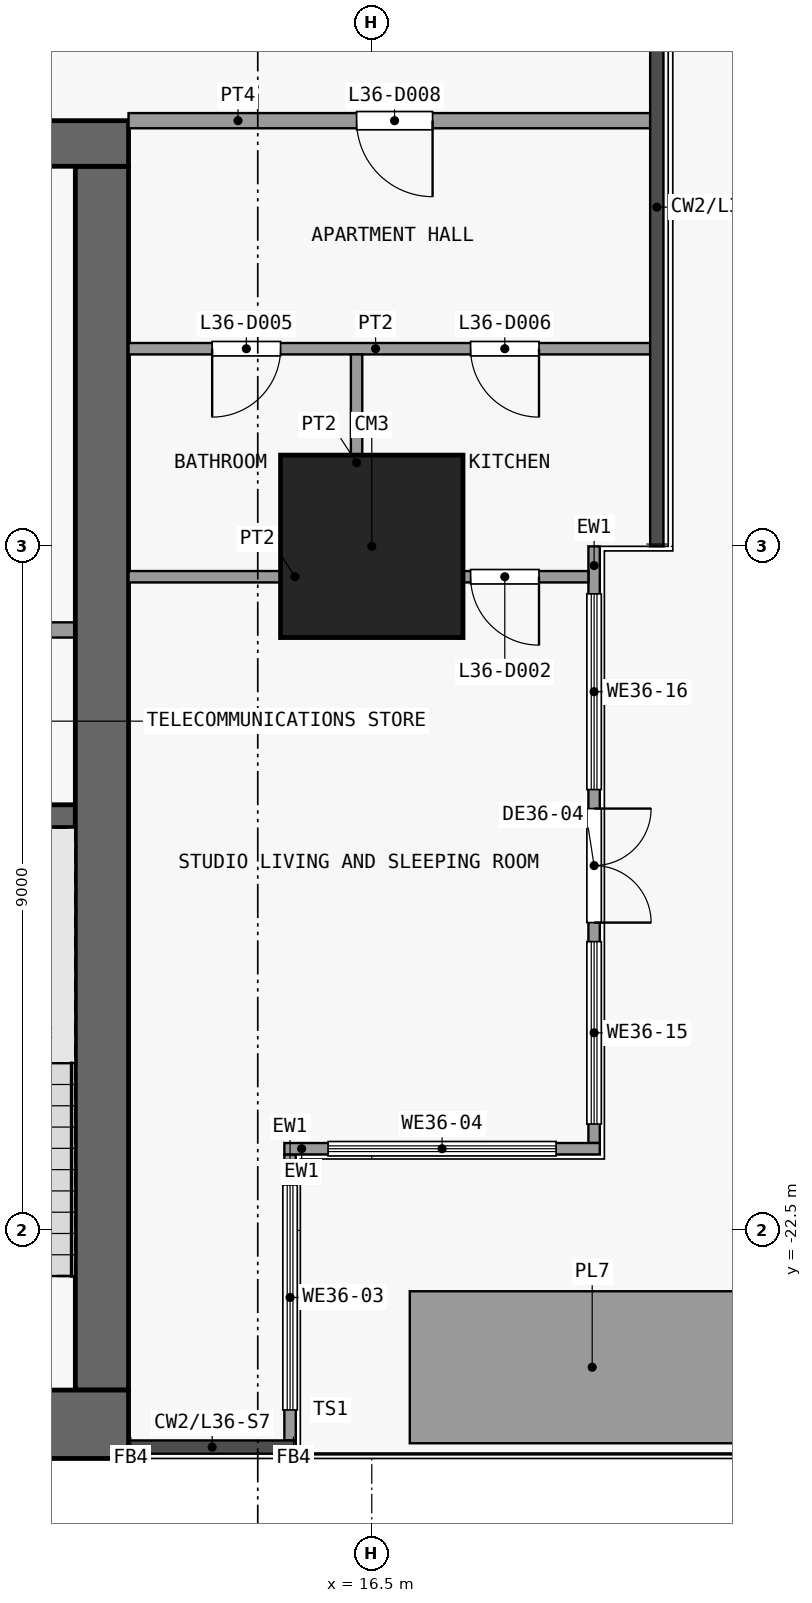
"""IFC4 building model, lengths in metres.
Left out: names, types, materials, properties, quantities, classifications, styles, units other than length and angle.
Written with IfcOpenShell. Run it as: python <this file> out.ifc"""

import sys

from ifc_helpers import new_model, si_unit, direction, frame, frame_2d, origin, origin_2d, place, context, subcontext, project, spatial, rectangle, extrude, element, fill, save


model = new_model("IFC4")
c1 = context("Model", 3, precision=1e-05, world=origin(), true_north=direction((0.0, 1.0)))
c2 = subcontext(c1, "Body", "Model", "MODEL_VIEW")
j1 = project(units=[si_unit("LENGTHUNIT", "METRE"), si_unit("PLANEANGLEUNIT", "RADIAN")], contexts=[c1])
p1 = place(None, origin())
s1 = spatial("IfcSite", under=j1, at=p1, CompositionType="ELEMENT")
p2 = place(p1, origin())
s2 = spatial("IfcBuilding", under=s1, at=p2, CompositionType="ELEMENT")
p3 = place(p2, frame((0.0, 0.0, 149.3)))
s3 = spatial("IfcBuildingStorey", under=s2, at=p3, CompositionType="ELEMENT", Elevation=149.3)
p4 = place(p3, frame((16.5, -13.5, 0.0), z_axis=(0.0, 0.0, 1.0), x_axis=(1.0, 0.0, 0.0)))
e1 = element("IfcColumn", 1, at=p4, inside=s3, PredefinedType="COLUMN", context=c2, shape_type="SweptSolid", body=[
    extrude(rectangle(XDim=2.4, YDim=2.4, at=origin_2d()), origin(), (0.0, 0.0, 1.0), 3.6),
])
p5 = place(p3, frame((-13.3, -25.05, 0.0), z_axis=(0.0, 0.0, 1.0), x_axis=(1.0, 0.0, 0.0)))
e2 = element("IfcWall", 2, at=p5, inside=s3, PredefinedType="SHEAR", context=c2, shape_type="SweptSolid", body=[
    extrude(rectangle(XDim=26.6, YDim=0.9, at=frame_2d((13.3, 0.0))), origin(), (0.0, 0.0, 1.0), 3.3),
])
p6 = place(p3, frame((-13.3, -8.2, 0.0), z_axis=(0.0, 0.0, 1.0), x_axis=(1.0, 0.0, 0.0)))
e3 = element("IfcWall", 3, at=p6, inside=s3, PredefinedType="SHEAR", context=c2, shape_type="SweptSolid", body=[
    extrude(rectangle(XDim=26.6, YDim=0.6, at=frame_2d((13.3, 0.0))), origin(), (0.0, 0.0, 1.0), 3.3),
])
p7 = place(p6, frame((7.6, 0.0, 0.0)))
e4 = element("IfcOpeningElement", 4, at=p7, cuts=e3, PredefinedType="OPENING", context=c2, shape_type="SweptSolid", body=[
    extrude(rectangle(XDim=1.8, YDim=2.1, at=frame_2d((0.9, 1.05))), frame((0.0, 0.31, 0.0), z_axis=(0.0, -1.0, 0.0), x_axis=(1.0, 0.0, 0.0)), (0.0, 0.0, 1.0), 0.62),
])
p8 = place(p6, frame((17.2, 0.0, 0.0)))
e5 = element("IfcOpeningElement", 5, at=p8, cuts=e3, PredefinedType="OPENING", context=c2, shape_type="SweptSolid", body=[
    extrude(rectangle(XDim=1.8, YDim=2.1, at=frame_2d((0.9, 1.05))), frame((0.0, 0.31, 0.0), z_axis=(0.0, -1.0, 0.0), x_axis=(1.0, 0.0, 0.0)), (0.0, 0.0, 1.0), 0.62),
])
p9 = place(p6, frame((1.525, 0.0, 0.0)))
e6 = element("IfcOpeningElement", 6, at=p9, cuts=e3, PredefinedType="OPENING", context=c2, shape_type="SweptSolid", body=[
    extrude(rectangle(XDim=1.2, YDim=2.1, at=frame_2d((0.6, 1.05))), frame((0.0, 0.31, 0.0), z_axis=(0.0, -1.0, 0.0), x_axis=(1.0, 0.0, 0.0)), (0.0, 0.0, 1.0), 0.62),
])
p10 = place(p6, frame((23.175, 0.0, 0.0)))
e7 = element("IfcOpeningElement", 7, at=p10, cuts=e3, PredefinedType="OPENING", context=c2, shape_type="SweptSolid", body=[
    extrude(rectangle(XDim=0.9, YDim=2.1, at=frame_2d((0.45, 1.05))), frame((0.0, 0.31, 0.0), z_axis=(0.0, -1.0, 0.0), x_axis=(1.0, 0.0, 0.0)), (0.0, 0.0, 1.0), 0.62),
])
p11 = place(p3, frame((12.95, -24.6, 0.0), z_axis=(0.0, 0.0, 1.0), x_axis=(0.0, 1.0, 0.0)))
e8 = element("IfcWall", 8, at=p11, inside=s3, PredefinedType="SHEAR", context=c2, shape_type="SweptSolid", body=[
    extrude(rectangle(XDim=16.1, YDim=0.7, at=frame_2d((8.05, 0.0))), origin(), (0.0, 0.0, 1.0), 3.3),
])
p12 = place(p3, frame((9.5, -17.05, 0.0), z_axis=(0.0, 0.0, 1.0), x_axis=(1.0, 0.0, 0.0)))
e9 = element("IfcWall", 9, at=p12, inside=s3, PredefinedType="SHEAR", context=c2, shape_type="SweptSolid", body=[
    extrude(rectangle(XDim=3.1, YDim=0.3, at=frame_2d((1.55, 0.0))), origin(), (0.0, 0.0, 1.0), 3.3),
])
p13 = place(p3, frame((11.15, -14.6, 0.0), z_axis=(0.0, 0.0, 1.0), x_axis=(1.0, 0.0, 0.0)))
e10 = element("IfcWall", 10, at=p13, inside=s3, PredefinedType="PARTITIONING", context=c2, shape_type="SweptSolid", body=[
    extrude(rectangle(XDim=1.45, YDim=0.2, at=frame_2d((0.725, 0.0))), origin(), (0.0, 0.0, 1.0), 3.3),
])
p14 = place(p3, frame((15.425, -21.5, 0.0), z_axis=(0.0, 0.0, 1.0), x_axis=(0.0, -1.0, 0.0)))
e11 = element("IfcWall", 11, at=p14, inside=s3, PredefinedType="SOLIDWALL", context=c2, shape_type="SweptSolid", body=[
    extrude(rectangle(XDim=3.762, YDim=0.15, at=frame_2d((1.881, 0.0))), origin(), (0.0, 0.0, 1.0), 3.3),
])
p15 = place(p14, frame((0.401, 0.0, 0.9)))
e12 = element("IfcOpeningElement", 12, at=p15, cuts=e11, PredefinedType="OPENING", context=c2, shape_type="SweptSolid", body=[
    extrude(rectangle(XDim=2.96, YDim=2.4, at=frame_2d((1.48, 1.2))), frame((0.0, 0.085, 0.0), z_axis=(0.0, -1.0, 0.0), x_axis=(1.0, 0.0, 0.0)), (0.0, 0.0, 1.0), 0.17),
])
p16 = place(p3, frame((19.5, -21.425, 0.0), z_axis=(0.0, 0.0, 1.0), x_axis=(-1.0, 0.0, 0.0)))
e13 = element("IfcWall", 13, at=p16, inside=s3, PredefinedType="SOLIDWALL", context=c2, shape_type="SweptSolid", body=[
    extrude(rectangle(XDim=4.15, YDim=0.15, at=frame_2d((2.075, 0.0))), origin(), (0.0, 0.0, 1.0), 3.3),
])
p17 = place(p16, frame((0.575, 0.0, 0.9)))
e14 = element("IfcOpeningElement", 14, at=p17, cuts=e13, PredefinedType="OPENING", context=c2, shape_type="SweptSolid", body=[
    extrude(rectangle(XDim=3.0, YDim=2.4, at=frame_2d((1.5, 1.2))), frame((0.0, 0.085, 0.0), z_axis=(0.0, -1.0, 0.0), x_axis=(1.0, 0.0, 0.0)), (0.0, 0.0, 1.0), 0.17),
])
p18 = place(p3, frame((19.425, -13.5, 0.0), z_axis=(0.0, 0.0, 1.0), x_axis=(0.0, -1.0, 0.0)))
e15 = element("IfcWall", 15, at=p18, inside=s3, PredefinedType="SOLIDWALL", context=c2, shape_type="SweptSolid", body=[
    extrude(rectangle(XDim=7.85, YDim=0.15, at=frame_2d((3.925, 0.0))), origin(), (0.0, 0.0, 1.0), 3.3),
])
p19 = place(p18, frame((3.45, 0.0, 0.0)))
e16 = element("IfcOpeningElement", 16, at=p19, cuts=e15, PredefinedType="OPENING", context=c2, shape_type="SweptSolid", body=[
    extrude(rectangle(XDim=1.5, YDim=2.4, at=frame_2d((0.75, 1.2))), frame((0.0, 0.085, 0.0), z_axis=(0.0, -1.0, 0.0), x_axis=(1.0, 0.0, 0.0)), (0.0, 0.0, 1.0), 0.17),
])
p20 = place(p18, frame((5.2, 0.0, 0.9)))
e17 = element("IfcOpeningElement", 17, at=p20, cuts=e15, PredefinedType="OPENING", context=c2, shape_type="SweptSolid", body=[
    extrude(rectangle(XDim=2.4, YDim=2.1, at=frame_2d((1.2, 1.05))), frame((0.0, 0.085, 0.0), z_axis=(0.0, -1.0, 0.0), x_axis=(1.0, 0.0, 0.0)), (0.0, 0.0, 1.0), 0.17),
])
p21 = place(p18, frame((0.625, 0.0, 0.9)))
e18 = element("IfcOpeningElement", 18, at=p21, cuts=e15, PredefinedType="OPENING", context=c2, shape_type="SweptSolid", body=[
    extrude(rectangle(XDim=2.575, YDim=2.1, at=frame_2d((1.288, 1.05))), frame((0.0, 0.085, 0.0), z_axis=(0.0, -1.0, 0.0), x_axis=(1.0, 0.0, 0.0)), (0.0, 0.0, 1.0), 0.17),
])
p22 = place(p3, frame((17.0, -24.3, 0.0), z_axis=(0.0, 0.0, 1.0), x_axis=(1.0, 0.0, 0.0)))
e19 = element("IfcWall", 19, at=p22, inside=s3, PredefinedType="USERDEFINED", context=c2, shape_type="SweptSolid", body=[
    extrude(rectangle(XDim=4.8, YDim=2.0, at=frame_2d((2.4, 0.0))), origin(), (0.0, 0.0, 1.0), 0.9),
])
p23 = place(p3, frame((13.3, -13.9, 0.0), z_axis=(0.0, 0.0, 1.0), x_axis=(1.0, 0.0, 0.0)))
e20 = element("IfcWall", 20, at=p23, inside=s3, PredefinedType="PARTITIONING", context=c2, shape_type="SweptSolid", body=[
    extrude(rectangle(XDim=6.05, YDim=0.15, at=frame_2d((3.025, 0.0))), origin(), (0.0, 0.0, 1.0), 3.3),
])
p24 = place(p23, frame((4.5, 0.0, 0.0)))
e21 = element("IfcOpeningElement", 21, at=p24, cuts=e20, PredefinedType="OPENING", context=c2, shape_type="SweptSolid", body=[
    extrude(rectangle(XDim=0.9, YDim=2.1, at=frame_2d((0.45, 1.05))), frame((0.0, 0.085, 0.0), z_axis=(0.0, -1.0, 0.0), x_axis=(1.0, 0.0, 0.0)), (0.0, 0.0, 1.0), 0.17),
])
p25 = place(p3, frame((13.3, -10.9, 0.0), z_axis=(0.0, 0.0, 1.0), x_axis=(1.0, 0.0, 0.0)))
e22 = element("IfcWall", 22, at=p25, inside=s3, PredefinedType="PARTITIONING", context=c2, shape_type="SweptSolid", body=[
    extrude(rectangle(XDim=6.863, YDim=0.15, at=frame_2d((3.431, 0.0))), origin(), (0.0, 0.0, 1.0), 3.3),
])
p26 = place(p25, frame((1.1, 0.0, 0.0)))
e23 = element("IfcOpeningElement", 23, at=p26, cuts=e22, PredefinedType="OPENING", context=c2, shape_type="SweptSolid", body=[
    extrude(rectangle(XDim=0.9, YDim=2.1, at=frame_2d((0.45, 1.05))), frame((0.0, 0.085, 0.0), z_axis=(0.0, -1.0, 0.0), x_axis=(1.0, 0.0, 0.0)), (0.0, 0.0, 1.0), 0.17),
])
p27 = place(p25, frame((4.5, 0.0, 0.0)))
e24 = element("IfcOpeningElement", 24, at=p27, cuts=e22, PredefinedType="OPENING", context=c2, shape_type="SweptSolid", body=[
    extrude(rectangle(XDim=0.9, YDim=2.1, at=frame_2d((0.45, 1.05))), frame((0.0, 0.085, 0.0), z_axis=(0.0, -1.0, 0.0), x_axis=(1.0, 0.0, 0.0)), (0.0, 0.0, 1.0), 0.17),
])
p28 = place(p3, frame((13.3, -7.9, 0.0), z_axis=(0.0, 0.0, 1.0), x_axis=(1.0, 0.0, 0.0)))
e25 = element("IfcWall", 25, at=p28, inside=s3, PredefinedType="PARTITIONING", context=c2, shape_type="SweptSolid", body=[
    extrude(rectangle(XDim=6.863, YDim=0.2, at=frame_2d((3.431, 0.0))), origin(), (0.0, 0.0, 1.0), 3.3),
])
p29 = place(p28, frame((3.0, 0.0, 0.0)))
e26 = element("IfcOpeningElement", 26, at=p29, cuts=e25, PredefinedType="OPENING", context=c2, shape_type="SweptSolid", body=[
    extrude(rectangle(XDim=1.0, YDim=2.1, at=frame_2d((0.5, 1.05))), frame((0.0, 0.11, 0.0), z_axis=(0.0, -1.0, 0.0), x_axis=(1.0, 0.0, 0.0)), (0.0, 0.0, 1.0), 0.22),
])
p30 = place(p3, frame((16.3, -13.825, 0.0), z_axis=(0.0, 0.0, 1.0), x_axis=(0.0, 1.0, 0.0)))
e27 = element("IfcWall", 27, at=p30, inside=s3, PredefinedType="PARTITIONING", context=c2, shape_type="SweptSolid", body=[
    extrude(rectangle(XDim=2.85, YDim=0.15, at=frame_2d((1.425, 0.0))), origin(), (0.0, 0.0, 1.0), 3.3),
])
p31 = place(p15, origin())
e28 = element("IfcWindow", 28, at=p31, inside=s3, PartitioningType="SINGLE_PANEL", PredefinedType="WINDOW", context=c2, shape_type="SweptSolid", body=[
    extrude(rectangle(XDim=2.96, YDim=2.4, at=frame_2d((1.48, 1.2))), frame((0.0, 0.03, 0.0), z_axis=(0.0, -1.0, 0.0), x_axis=(1.0, 0.0, 0.0)), (0.0, 0.0, 1.0), 0.06),
])
fill(e12, e28)
p32 = place(p17, origin())
e29 = element("IfcWindow", 29, at=p32, inside=s3, PartitioningType="SINGLE_PANEL", PredefinedType="WINDOW", context=c2, shape_type="SweptSolid", body=[
    extrude(rectangle(XDim=3.0, YDim=2.4, at=frame_2d((1.5, 1.2))), frame((0.0, 0.03, 0.0), z_axis=(0.0, -1.0, 0.0), x_axis=(1.0, 0.0, 0.0)), (0.0, 0.0, 1.0), 0.06),
])
fill(e14, e29)
p33 = place(p19, origin())
e30 = element("IfcDoor", 30, at=p33, inside=s3, OperationType="DOUBLE_DOOR_SINGLE_SWING", PredefinedType="DOOR", context=c2, shape_type="SweptSolid", body=[
    extrude(rectangle(XDim=1.5, YDim=2.4, at=frame_2d((0.75, 1.2))), frame((0.0, 0.025, 0.0), z_axis=(0.0, -1.0, 0.0), x_axis=(1.0, 0.0, 0.0)), (0.0, 0.0, 1.0), 0.05),
])
fill(e16, e30)
p34 = place(p20, origin())
e31 = element("IfcWindow", 31, at=p34, inside=s3, PartitioningType="SINGLE_PANEL", PredefinedType="WINDOW", context=c2, shape_type="SweptSolid", body=[
    extrude(rectangle(XDim=2.4, YDim=2.1, at=frame_2d((1.2, 1.05))), frame((0.0, 0.03, 0.0), z_axis=(0.0, -1.0, 0.0), x_axis=(1.0, 0.0, 0.0)), (0.0, 0.0, 1.0), 0.06),
])
fill(e17, e31)
p35 = place(p21, origin())
e32 = element("IfcWindow", 32, at=p35, inside=s3, PartitioningType="SINGLE_PANEL", PredefinedType="WINDOW", context=c2, shape_type="SweptSolid", body=[
    extrude(rectangle(XDim=2.575, YDim=2.1, at=frame_2d((1.288, 1.05))), frame((0.0, 0.03, 0.0), z_axis=(0.0, -1.0, 0.0), x_axis=(1.0, 0.0, 0.0)), (0.0, 0.0, 1.0), 0.06),
])
fill(e18, e32)
p36 = place(p24, origin())
e33 = element("IfcDoor", 33, at=p36, inside=s3, OperationType="SINGLE_SWING_RIGHT", PredefinedType="DOOR", context=c2, shape_type="SweptSolid", body=[
    extrude(rectangle(XDim=0.9, YDim=2.1, at=frame_2d((0.45, 1.05))), frame((0.0, 0.025, 0.0), z_axis=(0.0, -1.0, 0.0), x_axis=(1.0, 0.0, 0.0)), (0.0, 0.0, 1.0), 0.05),
])
fill(e21, e33)
p37 = place(p26, origin())
e34 = element("IfcDoor", 34, at=p37, inside=s3, OperationType="SINGLE_SWING_LEFT", PredefinedType="DOOR", context=c2, shape_type="SweptSolid", body=[
    extrude(rectangle(XDim=0.9, YDim=2.1, at=frame_2d((0.45, 1.05))), frame((0.0, 0.025, 0.0), z_axis=(0.0, -1.0, 0.0), x_axis=(1.0, 0.0, 0.0)), (0.0, 0.0, 1.0), 0.05),
])
fill(e23, e34)
p38 = place(p27, origin())
e35 = element("IfcDoor", 35, at=p38, inside=s3, OperationType="SINGLE_SWING_RIGHT", PredefinedType="DOOR", context=c2, shape_type="SweptSolid", body=[
    extrude(rectangle(XDim=0.9, YDim=2.1, at=frame_2d((0.45, 1.05))), frame((0.0, 0.025, 0.0), z_axis=(0.0, -1.0, 0.0), x_axis=(1.0, 0.0, 0.0)), (0.0, 0.0, 1.0), 0.05),
])
fill(e24, e35)
p39 = place(p29, origin())
e36 = element("IfcDoor", 36, at=p39, inside=s3, OperationType="SINGLE_SWING_RIGHT", PredefinedType="DOOR", context=c2, shape_type="SweptSolid", body=[
    extrude(rectangle(XDim=1.0, YDim=2.1, at=frame_2d((0.5, 1.05))), frame((0.0, 0.025, 0.0), z_axis=(0.0, -1.0, 0.0), x_axis=(1.0, 0.0, 0.0)), (0.0, 0.0, 1.0), 0.05),
])
fill(e26, e36)
save(model, sys.argv[1])
